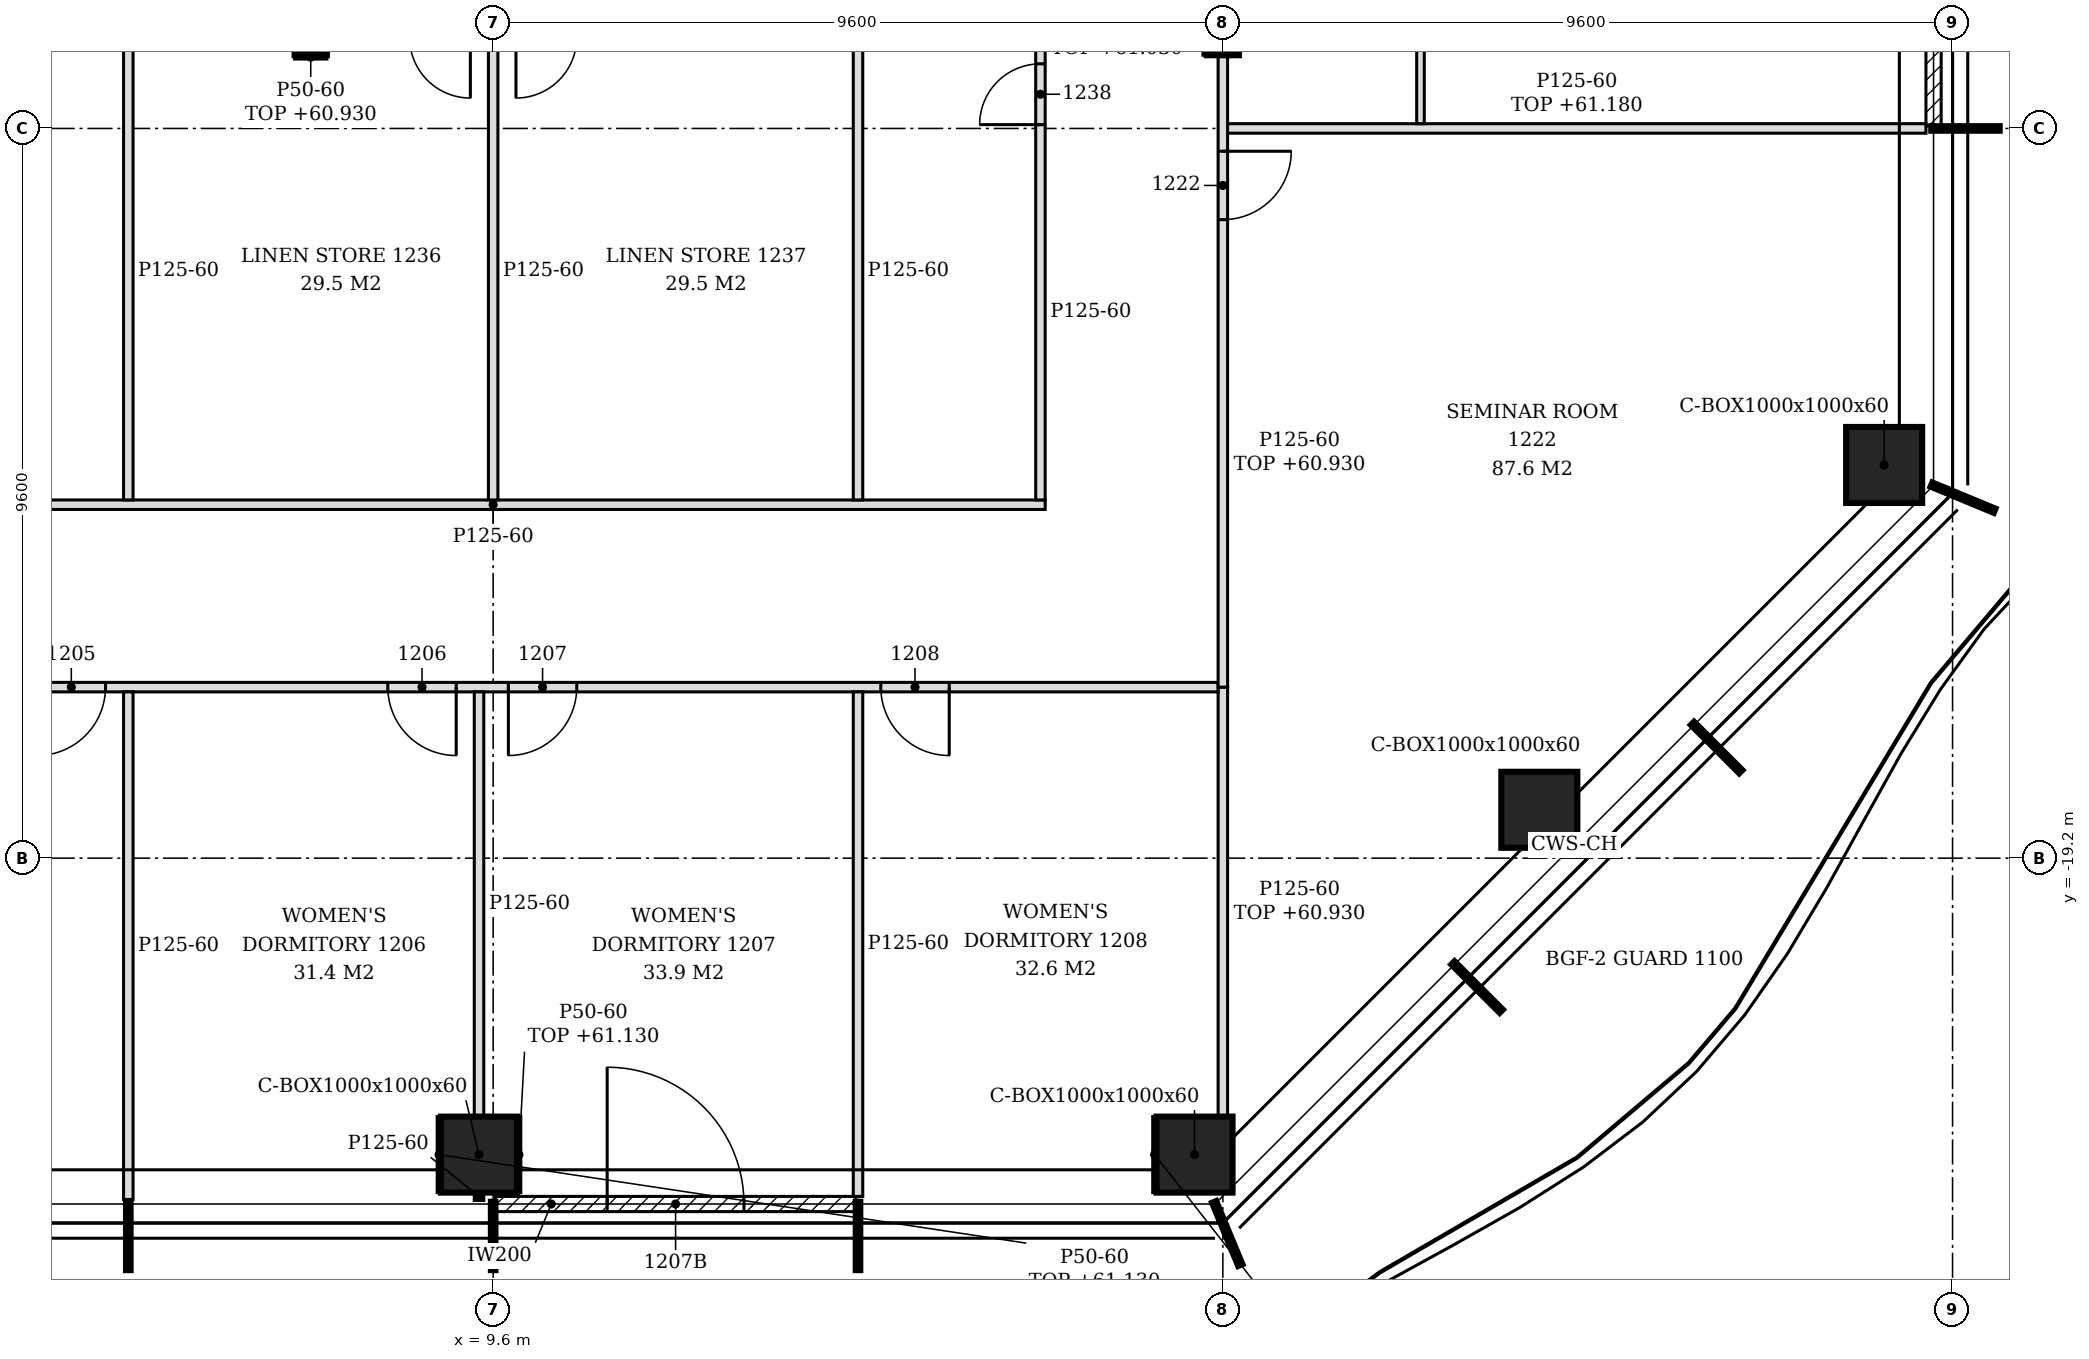
"""IFC4 building model, lengths in metres.
Left out: names, types, materials, properties, quantities, classifications, styles, units other than length and angle.
Written with IfcOpenShell. Run it as: python <this file> out.ifc"""

import sys

from ifc_helpers import new_model, si_unit, direction, frame, frame_2d, origin, origin_2d, place, context, subcontext, project, spatial, polyline, rectangle, hollow_rectangle, i_section, outline, extrude, element, fill, save


model = new_model("IFC4")
c1 = context("Model", 3, precision=1e-05, world=origin(), true_north=direction((0.0, 1.0)))
c2 = subcontext(c1, "Body", "Model", "MODEL_VIEW")
j1 = project(units=[si_unit("LENGTHUNIT", "METRE"), si_unit("PLANEANGLEUNIT", "RADIAN")], contexts=[c1])
p1 = place(None, origin())
s1 = spatial("IfcSite", under=j1, at=p1, CompositionType="ELEMENT")
p2 = place(p1, origin())
s2 = spatial("IfcBuilding", under=s1, at=p2, CompositionType="ELEMENT")
p3 = place(p2, frame((0.0, 0.0, 58.2)))
s3 = spatial("IfcBuildingStorey", under=s2, at=p3, CompositionType="ELEMENT", Elevation=58.2)
for number, where, z_axis, x_axis in (
    (1, (9.414, -23.1, -0.15), (0.0, 0.0, 1.0), (1.0, 0.0, 0.0)),
    (2, (18.827, -23.1, -0.15), (0.0, 0.0, 1.0), (1.0, 0.0, 0.0)),
    (3, (23.364, -18.564, -0.15), (0.0, 0.0, 1.0), (1.0, 0.0, 0.0)),
    (4, (27.9, -14.027, -0.15), (0.0, 0.0, 1.0), (1.0, 0.0, 0.0)),
):
    element("IfcColumn", number, at=place(p3, frame(where, z_axis=z_axis, x_axis=x_axis)), inside=s3, PredefinedType="COLUMN", context=c2, shape_type="SweptSolid", body=[
        extrude(hollow_rectangle(XDim=1.0, YDim=1.0, WallThickness=0.06, at=origin_2d()), origin(), (0.0, 0.0, 1.0), 3.6),
    ])
for number, where, z_axis, x_axis in (
    (5, (7.2, -8.4, -0.15), (0.0, 0.0, 1.0), (1.0, 0.0, 0.0)),
    (6, (19.2, -8.4, -0.15), (0.0, 0.0, 1.0), (1.0, 0.0, 0.0)),
):
    element("IfcColumn", number, at=place(p3, frame(where, z_axis=z_axis, x_axis=x_axis)), inside=s3, PredefinedType="COLUMN", context=c2, shape_type="SweptSolid", body=[
        extrude(i_section(OverallWidth=0.424, OverallDepth=0.474, WebThickness=0.048, FlangeThickness=0.077, FilletRadius=0.015, at=origin_2d()), origin(), (0.0, 0.0, 1.0), 3.6),
    ])
p4 = place(p3, frame((9.63, -23.75, 0.0), z_axis=(0.0, 0.0, 1.0), x_axis=(1.0, 0.0, 0.0)))
e7 = element("IfcWall", 7, at=p4, inside=s3, PredefinedType="NOTDEFINED", context=c2, shape_type="SweptSolid", body=[
    extrude(rectangle(XDim=4.74, YDim=0.2, at=frame_2d((2.37, 0.0))), origin(), (0.0, 0.0, 1.0), 3.45),
])
p5 = place(p4, frame((1.47, 0.0, 0.0)))
e8 = element("IfcOpeningElement", 8, at=p5, cuts=e7, PredefinedType="OPENING", context=c2, shape_type="SweptSolid", body=[
    extrude(rectangle(XDim=1.8, YDim=2.4, at=frame_2d((0.9, 1.2))), frame((0.0, 0.11, 0.0), z_axis=(0.0, -1.0, 0.0), x_axis=(1.0, 0.0, 0.0)), (0.0, 0.0, 1.0), 0.22),
])
p6 = place(p3, frame((28.55, -9.57, 0.0), z_axis=(0.0, 0.0, 1.0), x_axis=(0.0, 1.0, 0.0)))
e9 = element("IfcWall", 9, at=p6, inside=s3, PredefinedType="NOTDEFINED", context=c2, shape_type="SweptSolid", body=[
    extrude(rectangle(XDim=4.74, YDim=0.2, at=frame_2d((2.37, 0.0))), origin(), (0.0, 0.0, 1.0), 3.45),
])
p7 = place(p6, frame((1.17, 0.0, 0.0)))
e10 = element("IfcOpeningElement", 10, at=p7, cuts=e9, PredefinedType="OPENING", context=c2, shape_type="SweptSolid", body=[
    extrude(rectangle(XDim=2.4, YDim=2.4, at=frame_2d((1.2, 1.2))), frame((0.0, 0.11, 0.0), z_axis=(0.0, -1.0, 0.0), x_axis=(1.0, 0.0, 0.0)), (0.0, 0.0, 1.0), 0.22),
])
p8 = place(p3, frame((4.8, -23.69, 0.0), z_axis=(0.0, 0.0, 1.0), x_axis=(0.0, 1.0, 0.0)))
e11 = element("IfcWall", 11, at=p8, inside=s3, PredefinedType="PARTITIONING", context=c2, shape_type="SweptSolid", body=[
    extrude(outline(polyline([(0.0, 0.0), (6.677, 0.0), (6.677, 3.45), (4.595, 3.45), (4.593, 2.88), (4.385, 2.88), (4.383, 3.45), (0.74, 3.45), (0.738, 2.93), (0.44, 2.93), (0.438, 3.45), (0.0, 3.45), (0.0, 0.0)])), frame((0.0, 0.062, 0.0), z_axis=(0.0, -1.0, 0.0), x_axis=(1.0, 0.0, 0.0)), (0.0, 0.0, 1.0), 0.125),
])
p9 = place(p3, frame((9.414, -23.703, 0.0), z_axis=(0.0, 0.0, 1.0), x_axis=(0.0, 1.0, 0.0)))
e12 = element("IfcWall", 12, at=p9, inside=s3, PredefinedType="PARTITIONING", context=c2, shape_type="SweptSolid", body=[
    extrude(rectangle(XDim=0.103, YDim=0.125, at=frame_2d((0.051, 0.0))), origin(), (0.0, 0.0, 1.0), 3.45),
])
p10 = place(p3, frame((14.4, -23.65, 0.0), z_axis=(0.0, 0.0, 1.0), x_axis=(0.0, 1.0, 0.0)))
e13 = element("IfcWall", 13, at=p10, inside=s3, PredefinedType="PARTITIONING", context=c2, shape_type="SweptSolid", body=[
    extrude(outline(polyline([(0.0, 0.0), (6.637, 0.0), (6.637, 3.45), (4.555, 3.45), (4.553, 2.88), (4.345, 2.88), (4.343, 3.45), (0.7, 3.45), (0.698, 2.93), (0.4, 2.93), (0.398, 3.45), (0.0, 3.45), (0.0, 0.0)])), frame((0.0, 0.062, 0.0), z_axis=(0.0, -1.0, 0.0), x_axis=(1.0, 0.0, 0.0)), (0.0, 0.0, 1.0), 0.125),
])
p11 = place(p3, frame((9.414, -22.6, 0.0), z_axis=(0.0, 0.0, 1.0), x_axis=(0.0, 1.0, 0.0)))
e14 = element("IfcWall", 14, at=p11, inside=s3, PredefinedType="PARTITIONING", context=c2, shape_type="SweptSolid", body=[
    extrude(outline(polyline([(0.0, 0.0), (5.588, 0.0), (5.587, 3.45), (3.505, 3.45), (3.503, 2.88), (3.295, 2.88), (3.293, 3.45), (0.0, 3.45), (0.0, 0.0)])), frame((0.0, 0.062, 0.0), z_axis=(0.0, -1.0, 0.0), x_axis=(1.0, 0.0, 0.0)), (0.0, 0.0, 1.0), 0.125),
])
p12 = place(p3, frame((19.2, -22.6, 0.0), z_axis=(0.0, 0.0, 1.0), x_axis=(0.0, 1.0, 0.0)))
e15 = element("IfcWall", 15, at=p12, inside=s3, PredefinedType="PARTITIONING", context=c2, shape_type="SweptSolid", body=[
    extrude(outline(polyline([(0.0, 0.0), (5.65, 0.0), (5.65, 2.73), (0.43, 2.73), (0.428, 2.63), (0.0, 2.63), (0.0, 0.0)])), frame((0.0, 0.062, 0.0), z_axis=(0.0, -1.0, 0.0), x_axis=(1.0, 0.0, 0.0)), (0.0, 0.0, 1.0), 0.125),
])
p13 = place(p3, frame((-21.35, -16.95, 0.0), z_axis=(0.0, 0.0, 1.0), x_axis=(1.0, 0.0, 0.0)))
e16 = element("IfcWall", 16, at=p13, inside=s3, PredefinedType="PARTITIONING", context=c2, shape_type="SweptSolid", body=[
    extrude(outline(polyline([(0.0, 0.0), (40.488, 0.0), (40.488, 2.73), (40.4, 2.73), (40.398, 3.45), (28.7, 3.45), (28.698, 2.73), (28.4, 2.73), (28.398, 3.45), (16.7, 3.45), (16.698, 2.73), (16.4, 2.73), (16.398, 3.45), (7.1, 3.45), (7.098, 2.93), (6.8, 2.93), (6.798, 3.45), (0.0, 3.45), (0.0, 0.0)])), frame((0.0, 0.062, 0.0), z_axis=(0.0, -1.0, 0.0), x_axis=(1.0, 0.0, 0.0)), (0.0, 0.0, 1.0), 0.125),
])
p14 = place(p13, frame((5.75, 0.0, 0.0)))
e17 = element("IfcOpeningElement", 17, at=p14, cuts=e16, PredefinedType="OPENING", context=c2, shape_type="SweptSolid", body=[
    extrude(rectangle(XDim=0.9, YDim=2.1, at=frame_2d((0.45, 1.05))), frame((0.0, 0.073, 0.0), z_axis=(0.0, -1.0, 0.0), x_axis=(1.0, 0.0, 0.0)), (0.0, 0.0, 1.0), 0.145),
])
p15 = place(p13, frame((10.736, 0.0, 0.0)))
e18 = element("IfcOpeningElement", 18, at=p15, cuts=e16, PredefinedType="OPENING", context=c2, shape_type="SweptSolid", body=[
    extrude(rectangle(XDim=0.9, YDim=2.1, at=frame_2d((0.45, 1.05))), frame((0.0, 0.073, 0.0), z_axis=(0.0, -1.0, 0.0), x_axis=(1.0, 0.0, 0.0)), (0.0, 0.0, 1.0), 0.145),
])
p16 = place(p13, frame((15.35, 0.0, 0.0)))
e19 = element("IfcOpeningElement", 19, at=p16, cuts=e16, PredefinedType="OPENING", context=c2, shape_type="SweptSolid", body=[
    extrude(rectangle(XDim=0.9, YDim=2.1, at=frame_2d((0.45, 1.05))), frame((0.0, 0.073, 0.0), z_axis=(0.0, -1.0, 0.0), x_axis=(1.0, 0.0, 0.0)), (0.0, 0.0, 1.0), 0.145),
])
p17 = place(p13, frame((20.15, 0.0, 0.0)))
e20 = element("IfcOpeningElement", 20, at=p17, cuts=e16, PredefinedType="OPENING", context=c2, shape_type="SweptSolid", body=[
    extrude(rectangle(XDim=0.9, YDim=2.1, at=frame_2d((0.45, 1.05))), frame((0.0, 0.073, 0.0), z_axis=(0.0, -1.0, 0.0), x_axis=(1.0, 0.0, 0.0)), (0.0, 0.0, 1.0), 0.145),
])
p18 = place(p13, frame((24.95, 0.0, 0.0)))
e21 = element("IfcOpeningElement", 21, at=p18, cuts=e16, PredefinedType="OPENING", context=c2, shape_type="SweptSolid", body=[
    extrude(rectangle(XDim=0.9, YDim=2.1, at=frame_2d((0.45, 1.05))), frame((0.0, 0.073, 0.0), z_axis=(0.0, -1.0, 0.0), x_axis=(1.0, 0.0, 0.0)), (0.0, 0.0, 1.0), 0.145),
])
p19 = place(p13, frame((29.564, 0.0, 0.0)))
e22 = element("IfcOpeningElement", 22, at=p19, cuts=e16, PredefinedType="OPENING", context=c2, shape_type="SweptSolid", body=[
    extrude(rectangle(XDim=0.9, YDim=2.1, at=frame_2d((0.45, 1.05))), frame((0.0, 0.073, 0.0), z_axis=(0.0, -1.0, 0.0), x_axis=(1.0, 0.0, 0.0)), (0.0, 0.0, 1.0), 0.145),
])
p20 = place(p13, frame((31.15, 0.0, 0.0)))
e23 = element("IfcOpeningElement", 23, at=p20, cuts=e16, PredefinedType="OPENING", context=c2, shape_type="SweptSolid", body=[
    extrude(rectangle(XDim=0.9, YDim=2.1, at=frame_2d((0.45, 1.05))), frame((0.0, 0.073, 0.0), z_axis=(0.0, -1.0, 0.0), x_axis=(1.0, 0.0, 0.0)), (0.0, 0.0, 1.0), 0.145),
])
p21 = place(p13, frame((36.05, 0.0, 0.0)))
e24 = element("IfcOpeningElement", 24, at=p21, cuts=e16, PredefinedType="OPENING", context=c2, shape_type="SweptSolid", body=[
    extrude(rectangle(XDim=0.9, YDim=2.1, at=frame_2d((0.45, 1.05))), frame((0.0, 0.073, 0.0), z_axis=(0.0, -1.0, 0.0), x_axis=(1.0, 0.0, 0.0)), (0.0, 0.0, 1.0), 0.145),
])
p22 = place(p3, frame((19.2, -16.95, 0.0), z_axis=(0.0, 0.0, 1.0), x_axis=(0.0, 1.0, 0.0)))
e25 = element("IfcWall", 25, at=p22, inside=s3, PredefinedType="PARTITIONING", context=c2, shape_type="SweptSolid", body=[
    extrude(rectangle(XDim=8.313, YDim=0.125, at=frame_2d((4.156, 0.0))), origin(), (0.0, 0.0, 1.0), 2.73),
])
p23 = place(p22, frame((6.15, 0.0, 0.0)))
e26 = element("IfcOpeningElement", 26, at=p23, cuts=e25, PredefinedType="OPENING", context=c2, shape_type="SweptSolid", body=[
    extrude(rectangle(XDim=0.9, YDim=2.1, at=frame_2d((0.45, 1.05))), frame((0.0, 0.073, 0.0), z_axis=(0.0, -1.0, 0.0), x_axis=(1.0, 0.0, 0.0)), (0.0, 0.0, 1.0), 0.145),
])
p24 = place(p3, frame((2.337, -14.55, 0.0), z_axis=(0.0, 0.0, 1.0), x_axis=(1.0, 0.0, 0.0)))
e27 = element("IfcWall", 27, at=p24, inside=s3, PredefinedType="PARTITIONING", context=c2, shape_type="SweptSolid", body=[
    extrude(outline(polyline([(0.0, 0.0), (14.525, 0.0), (14.525, 3.45), (5.012, 3.45), (5.01, 2.73), (4.712, 2.73), (4.71, 3.45), (0.0, 3.45), (0.0, 0.0)])), frame((0.0, 0.062, 0.0), z_axis=(0.0, -1.0, 0.0), x_axis=(1.0, 0.0, 0.0)), (0.0, 0.0, 1.0), 0.125),
])
for number, where, z_axis, x_axis in (
    (28, (4.8, -14.488, 0.0), (0.0, 0.0, 1.0), (0.0, 1.0, 0.0)),
    (29, (9.6, -14.488, 0.0), (0.0, 0.0, 1.0), (0.0, 1.0, 0.0)),
    (30, (14.4, -14.488, 0.0), (0.0, 0.0, 1.0), (0.0, 1.0, 0.0)),
):
    element("IfcWall", number, at=place(p3, frame(where, z_axis=z_axis, x_axis=x_axis)), inside=s3, PredefinedType="PARTITIONING", context=c2, shape_type="SweptSolid", body=[
        extrude(outline(polyline([(0.0, 0.0), (6.025, 0.0), (6.025, 2.83), (5.938, 2.83), (5.936, 3.45), (0.192, 3.45), (0.19, 2.88), (0.0, 2.88), (0.0, 0.0)])), frame((0.0, 0.062, 0.0), z_axis=(0.0, -1.0, 0.0), x_axis=(1.0, 0.0, 0.0)), (0.0, 0.0, 1.0), 0.125),
    ])
p25 = place(p3, frame((16.8, -14.488, 0.0), z_axis=(0.0, 0.0, 1.0), x_axis=(0.0, 1.0, 0.0)))
e31 = element("IfcWall", 31, at=p25, inside=s3, PredefinedType="PARTITIONING", context=c2, shape_type="SweptSolid", body=[
    extrude(outline(polyline([(0.0, 0.0), (6.025, 0.0), (6.025, 2.83), (5.938, 2.83), (5.936, 3.45), (0.192, 3.45), (0.19, 2.88), (0.0, 2.88), (0.0, 0.0)])), frame((0.0, 0.062, 0.0), z_axis=(0.0, -1.0, 0.0), x_axis=(1.0, 0.0, 0.0)), (0.0, 0.0, 1.0), 0.125),
])
p26 = place(p25, frame((4.938, 0.0, 0.0)))
e32 = element("IfcOpeningElement", 32, at=p26, cuts=e31, PredefinedType="OPENING", context=c2, shape_type="SweptSolid", body=[
    extrude(rectangle(XDim=0.8, YDim=2.1, at=frame_2d((0.4, 1.05))), frame((0.0, 0.073, 0.0), z_axis=(0.0, -1.0, 0.0), x_axis=(1.0, 0.0, 0.0)), (0.0, 0.0, 1.0), 0.145),
])
p27 = place(p3, frame((19.262, -9.6, 0.0), z_axis=(0.0, 0.0, 1.0), x_axis=(1.0, 0.0, 0.0)))
e33 = element("IfcWall", 33, at=p27, inside=s3, PredefinedType="PARTITIONING", context=c2, shape_type="SweptSolid", body=[
    extrude(outline(polyline([(0.0, 0.0), (9.188, 0.0), (9.188, 2.98), (8.788, 2.98), (8.785, 2.93), (8.488, 2.93), (8.486, 2.98), (0.087, 2.98), (0.085, 2.73), (0.0, 2.73), (0.0, 0.0)])), frame((0.0, 0.062, 0.0), z_axis=(0.0, -1.0, 0.0), x_axis=(1.0, 0.0, 0.0)), (0.0, 0.0, 1.0), 0.125),
])
p28 = place(p3, frame((21.8, -9.538, 0.0), z_axis=(0.0, 0.0, 1.0), x_axis=(0.0, 1.0, 0.0)))
e34 = element("IfcWall", 34, at=p28, inside=s3, PredefinedType="PARTITIONING", context=c2, shape_type="SweptSolid", body=[
    extrude(outline(polyline([(0.0, 0.0), (2.288, 0.0), (2.288, 3.45), (0.032, 3.45), (0.031, 2.98), (0.0, 2.98), (0.0, 0.0)])), frame((0.0, 0.05, 0.0), z_axis=(0.0, -1.0, 0.0), x_axis=(1.0, 0.0, 0.0)), (0.0, 0.0, 1.0), 0.1),
])
for number, where, z_axis, x_axis in (
    (35, (8.889, -23.6, 0.0), (0.0, 0.0, 1.0), (0.0, 1.0, 0.0)),
    (36, (9.939, -23.6, 0.0), (0.0, 0.0, 1.0), (0.0, 1.0, 0.0)),
    (37, (18.302, -23.6, 0.0), (0.0, 0.0, 1.0), (0.0, 1.0, 0.0)),
):
    element("IfcWall", number, at=place(p3, frame(where, z_axis=z_axis, x_axis=x_axis)), inside=s3, PredefinedType="PARTITIONING", context=c2, shape_type="SweptSolid", body=[
        extrude(rectangle(XDim=1.0, YDim=0.05, at=frame_2d((0.5, 0.0))), origin(), (0.0, 0.0, 1.0), 2.93),
    ])
p29 = place(p3, frame((18.963, -8.637, 0.0), z_axis=(0.0, 0.0, 1.0), x_axis=(0.0, 1.0, 0.0)))
e38 = element("IfcWall", 38, at=p29, inside=s3, PredefinedType="PARTITIONING", context=c2, shape_type="SweptSolid", body=[
    extrude(rectangle(XDim=0.474, YDim=0.05, at=frame_2d((0.237, 0.0))), origin(), (0.0, 0.0, 1.0), 2.83),
])
p30 = place(p3, frame((6.988, -8.662, 0.0), z_axis=(0.0, 0.0, 1.0), x_axis=(1.0, 0.0, 0.0)))
e39 = element("IfcWall", 39, at=p30, inside=s3, PredefinedType="PARTITIONING", context=c2, shape_type="SweptSolid", body=[
    extrude(rectangle(XDim=0.424, YDim=0.05, at=frame_2d((0.212, 0.0))), origin(), (0.0, 0.0, 1.0), 2.73),
])
p31 = place(p5, origin())
e40 = element("IfcDoor", 40, at=p31, inside=s3, OperationType="SINGLE_SWING_LEFT", PredefinedType="DOOR", context=c2, shape_type="SweptSolid", body=[
    extrude(rectangle(XDim=1.8, YDim=2.4, at=frame_2d((0.9, 1.2))), frame((0.0, 0.025, 0.0), z_axis=(0.0, -1.0, 0.0), x_axis=(1.0, 0.0, 0.0)), (0.0, 0.0, 1.0), 0.05),
])
fill(e8, e40)
p32 = place(p18, frame((0.9, 0.0, 0.0), z_axis=(0.0, 0.0, 1.0), x_axis=(-1.0, 0.0, 0.0)))
e41 = element("IfcDoor", 41, at=p32, inside=s3, OperationType="SINGLE_SWING_RIGHT", PredefinedType="DOOR", context=c2, shape_type="SweptSolid", body=[
    extrude(rectangle(XDim=0.9, YDim=2.1, at=frame_2d((0.45, 1.05))), frame((0.0, 0.025, 0.0), z_axis=(0.0, -1.0, 0.0), x_axis=(1.0, 0.0, 0.0)), (0.0, 0.0, 1.0), 0.05),
])
fill(e21, e41)
p33 = place(p19, frame((0.9, 0.0, 0.0), z_axis=(0.0, 0.0, 1.0), x_axis=(-1.0, 0.0, 0.0)))
e42 = element("IfcDoor", 42, at=p33, inside=s3, OperationType="SINGLE_SWING_LEFT", PredefinedType="DOOR", context=c2, shape_type="SweptSolid", body=[
    extrude(rectangle(XDim=0.9, YDim=2.1, at=frame_2d((0.45, 1.05))), frame((0.0, 0.025, 0.0), z_axis=(0.0, -1.0, 0.0), x_axis=(1.0, 0.0, 0.0)), (0.0, 0.0, 1.0), 0.05),
])
fill(e22, e42)
p34 = place(p20, frame((0.9, 0.0, 0.0), z_axis=(0.0, 0.0, 1.0), x_axis=(-1.0, 0.0, 0.0)))
e43 = element("IfcDoor", 43, at=p34, inside=s3, OperationType="SINGLE_SWING_RIGHT", PredefinedType="DOOR", context=c2, shape_type="SweptSolid", body=[
    extrude(rectangle(XDim=0.9, YDim=2.1, at=frame_2d((0.45, 1.05))), frame((0.0, 0.025, 0.0), z_axis=(0.0, -1.0, 0.0), x_axis=(1.0, 0.0, 0.0)), (0.0, 0.0, 1.0), 0.05),
])
fill(e23, e43)
p35 = place(p21, frame((0.9, 0.0, 0.0), z_axis=(0.0, 0.0, 1.0), x_axis=(-1.0, 0.0, 0.0)))
e44 = element("IfcDoor", 44, at=p35, inside=s3, OperationType="SINGLE_SWING_LEFT", PredefinedType="DOOR", context=c2, shape_type="SweptSolid", body=[
    extrude(rectangle(XDim=0.9, YDim=2.1, at=frame_2d((0.45, 1.05))), frame((0.0, 0.025, 0.0), z_axis=(0.0, -1.0, 0.0), x_axis=(1.0, 0.0, 0.0)), (0.0, 0.0, 1.0), 0.05),
])
fill(e24, e44)
p36 = place(p23, frame((0.9, 0.0, 0.0), z_axis=(0.0, 0.0, 1.0), x_axis=(-1.0, 0.0, 0.0)))
e45 = element("IfcDoor", 45, at=p36, inside=s3, OperationType="SINGLE_SWING_LEFT", PredefinedType="DOOR", context=c2, shape_type="SweptSolid", body=[
    extrude(rectangle(XDim=0.9, YDim=2.1, at=frame_2d((0.45, 1.05))), frame((0.0, 0.025, 0.0), z_axis=(0.0, -1.0, 0.0), x_axis=(1.0, 0.0, 0.0)), (0.0, 0.0, 1.0), 0.05),
])
fill(e26, e45)
p37 = place(p26, origin())
e46 = element("IfcDoor", 46, at=p37, inside=s3, OperationType="SINGLE_SWING_LEFT", PredefinedType="DOOR", context=c2, shape_type="SweptSolid", body=[
    extrude(rectangle(XDim=0.8, YDim=2.1, at=frame_2d((0.4, 1.05))), frame((0.0, 0.025, 0.0), z_axis=(0.0, -1.0, 0.0), x_axis=(1.0, 0.0, 0.0)), (0.0, 0.0, 1.0), 0.05),
])
fill(e32, e46)
save(model, sys.argv[1])
